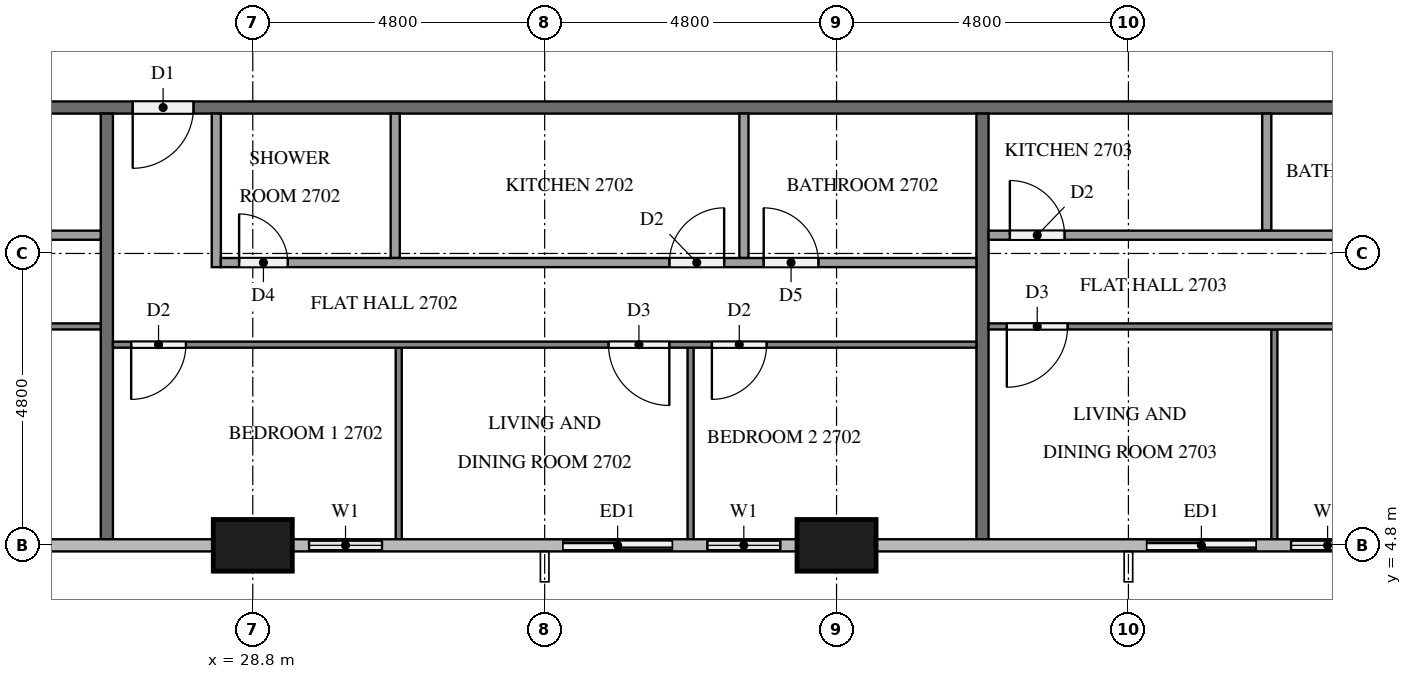
"""IFC4 building model, lengths in metres.
Left out: names, types, materials, properties, quantities, classifications, styles, units other than length and angle.
Written with IfcOpenShell. Run it as: python <this file> out.ifc"""

import sys

from ifc_helpers import new_model, si_unit, direction, frame, frame_2d, origin, origin_2d, place, context, subcontext, project, spatial, rectangle, extrude, element, fill, save


model = new_model("IFC4")
c1 = context("Model", 3, precision=1e-05, world=origin(), true_north=direction((0.0, 1.0)))
c2 = subcontext(c1, "Body", "Model", "MODEL_VIEW")
j1 = project(units=[si_unit("LENGTHUNIT", "METRE"), si_unit("PLANEANGLEUNIT", "RADIAN")], contexts=[c1])
p1 = place(None, origin())
s1 = spatial("IfcSite", under=j1, at=p1, CompositionType="ELEMENT")
p2 = place(p1, origin())
s2 = spatial("IfcBuilding", under=s1, at=p2, CompositionType="ELEMENT")
p3 = place(p2, frame((0.0, 0.0, 106.7)))
s3 = spatial("IfcBuildingStorey", under=s2, at=p3, CompositionType="ELEMENT", Elevation=106.7)
for number, where, z_axis, x_axis in (
    (1, (28.8, 4.8, 0.0), (0.0, 0.0, 1.0), (1.0, 0.0, 0.0)),
    (2, (38.4, 4.8, 0.0), (0.0, 0.0, 1.0), (1.0, 0.0, 0.0)),
):
    element("IfcColumn", number, at=place(p3, frame(where, z_axis=z_axis, x_axis=x_axis)), inside=s3, PredefinedType="COLUMN", context=c2, shape_type="SweptSolid", body=[
        extrude(rectangle(XDim=1.3, YDim=0.85, at=origin_2d()), origin(), (0.0, 0.0, 1.0), 3.2),
    ])
p4 = place(p3, frame((29.45, 4.8, 0.0), z_axis=(0.0, 0.0, 1.0), x_axis=(1.0, 0.0, 0.0)))
e3 = element("IfcWall", 3, at=p4, inside=s3, PredefinedType="SOLIDWALL", context=c2, shape_type="SweptSolid", body=[
    extrude(rectangle(XDim=1.75, YDim=0.15, at=frame_2d((0.875, 0.0))), origin(), (0.0, 0.0, 1.0), 3.2),
])
p5 = place(p4, frame((0.275, 0.0, 0.9)))
e4 = element("IfcOpeningElement", 4, at=p5, cuts=e3, PredefinedType="OPENING", context=c2, shape_type="SweptSolid", body=[
    extrude(rectangle(XDim=1.2, YDim=1.4, at=frame_2d((0.6, 0.7))), frame((0.0, 0.085, 0.0), z_axis=(0.0, -1.0, 0.0), x_axis=(1.0, 0.0, 0.0)), (0.0, 0.0, 1.0), 0.17),
])
p6 = place(p3, frame((33.6, 4.8, 0.0), z_axis=(0.0, 0.0, 1.0), x_axis=(1.0, 0.0, 0.0)))
e5 = element("IfcWall", 5, at=p6, inside=s3, PredefinedType="SOLIDWALL", context=c2, shape_type="SweptSolid", body=[
    extrude(rectangle(XDim=4.15, YDim=0.15, at=frame_2d((2.075, 0.0))), origin(), (0.0, 0.0, 1.0), 3.2),
])
p7 = place(p6, frame((0.3, 0.0, 0.0)))
e6 = element("IfcOpeningElement", 6, at=p7, cuts=e5, PredefinedType="OPENING", context=c2, shape_type="SweptSolid", body=[
    extrude(rectangle(XDim=1.8, YDim=2.4, at=frame_2d((0.9, 1.2))), frame((0.0, 0.085, 0.0), z_axis=(0.0, -1.0, 0.0), x_axis=(1.0, 0.0, 0.0)), (0.0, 0.0, 1.0), 0.17),
])
p8 = place(p6, frame((2.675, 0.0, 0.9)))
e7 = element("IfcOpeningElement", 7, at=p8, cuts=e5, PredefinedType="OPENING", context=c2, shape_type="SweptSolid", body=[
    extrude(rectangle(XDim=1.2, YDim=1.4, at=frame_2d((0.6, 0.7))), frame((0.0, 0.085, 0.0), z_axis=(0.0, -1.0, 0.0), x_axis=(1.0, 0.0, 0.0)), (0.0, 0.0, 1.0), 0.17),
])
p9 = place(p3, frame((43.2, 4.8, 0.0), z_axis=(0.0, 0.0, 1.0), x_axis=(1.0, 0.0, 0.0)))
e8 = element("IfcWall", 8, at=p9, inside=s3, PredefinedType="SOLIDWALL", context=c2, shape_type="SweptSolid", body=[
    extrude(rectangle(XDim=4.15, YDim=0.15, at=frame_2d((2.075, 0.0))), origin(), (0.0, 0.0, 1.0), 3.2),
])
p10 = place(p9, frame((0.3, 0.0, 0.0)))
e9 = element("IfcOpeningElement", 9, at=p10, cuts=e8, PredefinedType="OPENING", context=c2, shape_type="SweptSolid", body=[
    extrude(rectangle(XDim=1.8, YDim=2.4, at=frame_2d((0.9, 1.2))), frame((0.0, 0.085, 0.0), z_axis=(0.0, -1.0, 0.0), x_axis=(1.0, 0.0, 0.0)), (0.0, 0.0, 1.0), 0.17),
])
p11 = place(p9, frame((2.675, 0.0, 0.9)))
e10 = element("IfcOpeningElement", 10, at=p11, cuts=e8, PredefinedType="OPENING", context=c2, shape_type="SweptSolid", body=[
    extrude(rectangle(XDim=1.2, YDim=1.4, at=frame_2d((0.6, 0.7))), frame((0.0, 0.085, 0.0), z_axis=(0.0, -1.0, 0.0), x_axis=(1.0, 0.0, 0.0)), (0.0, 0.0, 1.0), 0.17),
])
p12 = place(p3, frame((50.5, 12.0, 0.0), z_axis=(0.0, 0.0, 1.0), x_axis=(-1.0, 0.0, 0.0)))
e11 = element("IfcWall", 11, at=p12, inside=s3, PredefinedType="PARTITIONING", context=c2, shape_type="SweptSolid", body=[
    extrude(rectangle(XDim=38.6, YDim=0.2, at=frame_2d((19.3, 0.0))), origin(), (0.0, 0.0, 1.0), 3.2),
])
p13 = place(p12, frame((37.075, 0.0, 0.0)))
e12 = element("IfcOpeningElement", 12, at=p13, cuts=e11, PredefinedType="OPENING", context=c2, shape_type="SweptSolid", body=[
    extrude(rectangle(XDim=1.0, YDim=2.1, at=frame_2d((0.5, 1.05))), frame((0.0, 0.11, 0.0), z_axis=(0.0, -1.0, 0.0), x_axis=(1.0, 0.0, 0.0)), (0.0, 0.0, 1.0), 0.22),
])
p14 = place(p12, frame((22.675, 0.0, 0.0)))
e13 = element("IfcOpeningElement", 13, at=p14, cuts=e11, PredefinedType="OPENING", context=c2, shape_type="SweptSolid", body=[
    extrude(rectangle(XDim=1.0, YDim=2.1, at=frame_2d((0.5, 1.05))), frame((0.0, 0.11, 0.0), z_axis=(0.0, -1.0, 0.0), x_axis=(1.0, 0.0, 0.0)), (0.0, 0.0, 1.0), 0.22),
])
p15 = place(p12, frame((0.525, 0.0, 0.0)))
e14 = element("IfcOpeningElement", 14, at=p15, cuts=e11, PredefinedType="OPENING", context=c2, shape_type="SweptSolid", body=[
    extrude(rectangle(XDim=1.0, YDim=2.1, at=frame_2d((0.5, 1.05))), frame((0.0, 0.11, 0.0), z_axis=(0.0, -1.0, 0.0), x_axis=(1.0, 0.0, 0.0)), (0.0, 0.0, 1.0), 0.22),
])
for number, where, z_axis, x_axis in (
    (15, (26.4, 11.9, 0.0), (0.0, 0.0, 1.0), (0.0, -1.0, 0.0)),
    (16, (40.8, 11.9, 0.0), (0.0, 0.0, 1.0), (0.0, -1.0, 0.0)),
):
    element("IfcWall", number, at=place(p3, frame(where, z_axis=z_axis, x_axis=x_axis)), inside=s3, PredefinedType="PARTITIONING", context=c2, shape_type="SweptSolid", body=[
        extrude(rectangle(XDim=7.0, YDim=0.2, at=frame_2d((3.5, 0.0))), origin(), (0.0, 0.0, 1.0), 3.2),
    ])
p16 = place(p3, frame((26.3, 8.4, 0.0), z_axis=(0.0, 0.0, 1.0), x_axis=(-1.0, 0.0, 0.0)))
e17 = element("IfcWall", 17, at=p16, inside=s3, PredefinedType="PARTITIONING", context=c2, shape_type="SweptSolid", body=[
    extrude(rectangle(XDim=14.2, YDim=0.1, at=frame_2d((7.1, 0.0))), origin(), (0.0, 0.0, 1.0), 3.2),
])
p17 = place(p16, frame((12.9, 0.0, 0.0)))
e18 = element("IfcOpeningElement", 18, at=p17, cuts=e17, PredefinedType="OPENING", context=c2, shape_type="SweptSolid", body=[
    extrude(rectangle(XDim=1.0, YDim=2.1, at=frame_2d((0.5, 1.05))), frame((0.0, 0.06, 0.0), z_axis=(0.0, -1.0, 0.0), x_axis=(1.0, 0.0, 0.0)), (0.0, 0.0, 1.0), 0.12),
])
p18 = place(p16, frame((5.05, 0.0, 0.0)))
e19 = element("IfcOpeningElement", 19, at=p18, cuts=e17, PredefinedType="OPENING", context=c2, shape_type="SweptSolid", body=[
    extrude(rectangle(XDim=0.9, YDim=2.1, at=frame_2d((0.45, 1.05))), frame((0.0, 0.06, 0.0), z_axis=(0.0, -1.0, 0.0), x_axis=(1.0, 0.0, 0.0)), (0.0, 0.0, 1.0), 0.12),
])
p19 = place(p16, frame((3.45, 0.0, 0.0)))
e20 = element("IfcOpeningElement", 20, at=p19, cuts=e17, PredefinedType="OPENING", context=c2, shape_type="SweptSolid", body=[
    extrude(rectangle(XDim=0.9, YDim=2.1, at=frame_2d((0.45, 1.05))), frame((0.0, 0.06, 0.0), z_axis=(0.0, -1.0, 0.0), x_axis=(1.0, 0.0, 0.0)), (0.0, 0.0, 1.0), 0.12),
])
p20 = place(p3, frame((13.875, 9.9, 0.0), z_axis=(0.0, 0.0, 1.0), x_axis=(1.0, 0.0, 0.0)))
e21 = element("IfcWall", 21, at=p20, inside=s3, PredefinedType="PARTITIONING", context=c2, shape_type="SweptSolid", body=[
    extrude(rectangle(XDim=12.425, YDim=0.15, at=frame_2d((6.212, 0.0))), origin(), (0.0, 0.0, 1.0), 3.2),
])
p21 = place(p20, frame((0.3, 0.0, 0.0)))
e22 = element("IfcOpeningElement", 22, at=p21, cuts=e21, PredefinedType="OPENING", context=c2, shape_type="SweptSolid", body=[
    extrude(rectangle(XDim=0.8, YDim=2.1, at=frame_2d((0.4, 1.05))), frame((0.0, 0.085, 0.0), z_axis=(0.0, -1.0, 0.0), x_axis=(1.0, 0.0, 0.0)), (0.0, 0.0, 1.0), 0.17),
])
p22 = place(p20, frame((5.465, 0.0, 0.0)))
e23 = element("IfcOpeningElement", 23, at=p22, cuts=e21, PredefinedType="OPENING", context=c2, shape_type="SweptSolid", body=[
    extrude(rectangle(XDim=0.9, YDim=2.1, at=frame_2d((0.45, 1.05))), frame((0.0, 0.085, 0.0), z_axis=(0.0, -1.0, 0.0), x_axis=(1.0, 0.0, 0.0)), (0.0, 0.0, 1.0), 0.17),
])
p23 = place(p20, frame((7.015, 0.0, 0.0)))
e24 = element("IfcOpeningElement", 24, at=p23, cuts=e21, PredefinedType="OPENING", context=c2, shape_type="SweptSolid", body=[
    extrude(rectangle(XDim=0.9, YDim=2.1, at=frame_2d((0.45, 1.05))), frame((0.0, 0.085, 0.0), z_axis=(0.0, -1.0, 0.0), x_axis=(1.0, 0.0, 0.0)), (0.0, 0.0, 1.0), 0.17),
])
for number, where, z_axis, x_axis in (
    (25, (31.2, 8.05, 0.0), (0.0, 0.0, 1.0), (0.0, -1.0, 0.0)),
    (26, (36.0, 8.05, 0.0), (0.0, 0.0, 1.0), (0.0, -1.0, 0.0)),
):
    element("IfcWall", number, at=place(p3, frame(where, z_axis=z_axis, x_axis=x_axis)), inside=s3, PredefinedType="PARTITIONING", context=c2, shape_type="SweptSolid", body=[
        extrude(rectangle(XDim=3.15, YDim=0.1, at=frame_2d((1.575, 0.0))), origin(), (0.0, 0.0, 1.0), 3.2),
    ])
p24 = place(p3, frame((40.7, 8.1, 0.0), z_axis=(0.0, 0.0, 1.0), x_axis=(-1.0, 0.0, 0.0)))
e27 = element("IfcWall", 27, at=p24, inside=s3, PredefinedType="PARTITIONING", context=c2, shape_type="SweptSolid", body=[
    extrude(rectangle(XDim=14.2, YDim=0.1, at=frame_2d((7.1, 0.0))), origin(), (0.0, 0.0, 1.0), 3.2),
])
p25 = place(p24, frame((13.0, 0.0, 0.0)))
e28 = element("IfcOpeningElement", 28, at=p25, cuts=e27, PredefinedType="OPENING", context=c2, shape_type="SweptSolid", body=[
    extrude(rectangle(XDim=0.9, YDim=2.1, at=frame_2d((0.45, 1.05))), frame((0.0, 0.06, 0.0), z_axis=(0.0, -1.0, 0.0), x_axis=(1.0, 0.0, 0.0)), (0.0, 0.0, 1.0), 0.12),
])
p26 = place(p24, frame((5.05, 0.0, 0.0)))
e29 = element("IfcOpeningElement", 29, at=p26, cuts=e27, PredefinedType="OPENING", context=c2, shape_type="SweptSolid", body=[
    extrude(rectangle(XDim=1.0, YDim=2.1, at=frame_2d((0.5, 1.05))), frame((0.0, 0.06, 0.0), z_axis=(0.0, -1.0, 0.0), x_axis=(1.0, 0.0, 0.0)), (0.0, 0.0, 1.0), 0.12),
])
p27 = place(p24, frame((3.45, 0.0, 0.0)))
e30 = element("IfcOpeningElement", 30, at=p27, cuts=e27, PredefinedType="OPENING", context=c2, shape_type="SweptSolid", body=[
    extrude(rectangle(XDim=0.9, YDim=2.1, at=frame_2d((0.45, 1.05))), frame((0.0, 0.06, 0.0), z_axis=(0.0, -1.0, 0.0), x_axis=(1.0, 0.0, 0.0)), (0.0, 0.0, 1.0), 0.12),
])
for number, where, z_axis, x_axis in (
    (31, (31.142, 11.9, 0.0), (0.0, 0.0, 1.0), (0.0, -1.0, 0.0)),
    (32, (36.877, 11.9, 0.0), (0.0, 0.0, 1.0), (0.0, -1.0, 0.0)),
):
    element("IfcWall", number, at=place(p3, frame(where, z_axis=z_axis, x_axis=x_axis)), inside=s3, PredefinedType="PARTITIONING", context=c2, shape_type="SweptSolid", body=[
        extrude(rectangle(XDim=2.375, YDim=0.15, at=frame_2d((1.188, 0.0))), origin(), (0.0, 0.0, 1.0), 3.2),
    ])
p28 = place(p3, frame((28.2, 11.9, 0.0), z_axis=(0.0, 0.0, 1.0), x_axis=(0.0, -1.0, 0.0)))
e33 = element("IfcWall", 33, at=p28, inside=s3, PredefinedType="PARTITIONING", context=c2, shape_type="SweptSolid", body=[
    extrude(rectangle(XDim=2.525, YDim=0.15, at=frame_2d((1.262, 0.0))), origin(), (0.0, 0.0, 1.0), 3.2),
])
p29 = place(p3, frame((28.275, 9.45, 0.0), z_axis=(0.0, 0.0, 1.0), x_axis=(1.0, 0.0, 0.0)))
e34 = element("IfcWall", 34, at=p29, inside=s3, PredefinedType="PARTITIONING", context=c2, shape_type="SweptSolid", body=[
    extrude(rectangle(XDim=12.425, YDim=0.15, at=frame_2d((6.212, 0.0))), origin(), (0.0, 0.0, 1.0), 3.2),
])
p30 = place(p29, frame((0.3, 0.0, 0.0)))
e35 = element("IfcOpeningElement", 35, at=p30, cuts=e34, PredefinedType="OPENING", context=c2, shape_type="SweptSolid", body=[
    extrude(rectangle(XDim=0.8, YDim=2.1, at=frame_2d((0.4, 1.05))), frame((0.0, 0.085, 0.0), z_axis=(0.0, -1.0, 0.0), x_axis=(1.0, 0.0, 0.0)), (0.0, 0.0, 1.0), 0.17),
])
p31 = place(p29, frame((7.377, 0.0, 0.0)))
e36 = element("IfcOpeningElement", 36, at=p31, cuts=e34, PredefinedType="OPENING", context=c2, shape_type="SweptSolid", body=[
    extrude(rectangle(XDim=0.9, YDim=2.1, at=frame_2d((0.45, 1.05))), frame((0.0, 0.085, 0.0), z_axis=(0.0, -1.0, 0.0), x_axis=(1.0, 0.0, 0.0)), (0.0, 0.0, 1.0), 0.17),
])
p32 = place(p29, frame((8.927, 0.0, 0.0)))
e37 = element("IfcOpeningElement", 37, at=p32, cuts=e34, PredefinedType="OPENING", context=c2, shape_type="SweptSolid", body=[
    extrude(rectangle(XDim=0.9, YDim=2.1, at=frame_2d((0.45, 1.05))), frame((0.0, 0.085, 0.0), z_axis=(0.0, -1.0, 0.0), x_axis=(1.0, 0.0, 0.0)), (0.0, 0.0, 1.0), 0.17),
])
p33 = place(p3, frame((45.6, 8.35, 0.0), z_axis=(0.0, 0.0, 1.0), x_axis=(0.0, -1.0, 0.0)))
e38 = element("IfcWall", 38, at=p33, inside=s3, PredefinedType="PARTITIONING", context=c2, shape_type="SweptSolid", body=[
    extrude(rectangle(XDim=3.45, YDim=0.1, at=frame_2d((1.725, 0.0))), origin(), (0.0, 0.0, 1.0), 3.2),
])
p34 = place(p3, frame((50.3, 8.4, 0.0), z_axis=(0.0, 0.0, 1.0), x_axis=(-1.0, 0.0, 0.0)))
e39 = element("IfcWall", 39, at=p34, inside=s3, PredefinedType="PARTITIONING", context=c2, shape_type="SweptSolid", body=[
    extrude(rectangle(XDim=9.4, YDim=0.1, at=frame_2d((4.7, 0.0))), origin(), (0.0, 0.0, 1.0), 3.2),
])
p35 = place(p34, frame((0.3, 0.0, 0.0)))
e40 = element("IfcOpeningElement", 40, at=p35, cuts=e39, PredefinedType="OPENING", context=c2, shape_type="SweptSolid", body=[
    extrude(rectangle(XDim=0.9, YDim=2.1, at=frame_2d((0.45, 1.05))), frame((0.0, 0.06, 0.0), z_axis=(0.0, -1.0, 0.0), x_axis=(1.0, 0.0, 0.0)), (0.0, 0.0, 1.0), 0.12),
])
p36 = place(p34, frame((8.1, 0.0, 0.0)))
e41 = element("IfcOpeningElement", 41, at=p36, cuts=e39, PredefinedType="OPENING", context=c2, shape_type="SweptSolid", body=[
    extrude(rectangle(XDim=1.0, YDim=2.1, at=frame_2d((0.5, 1.05))), frame((0.0, 0.06, 0.0), z_axis=(0.0, -1.0, 0.0), x_axis=(1.0, 0.0, 0.0)), (0.0, 0.0, 1.0), 0.12),
])
p37 = place(p3, frame((45.475, 11.9, 0.0), z_axis=(0.0, 0.0, 1.0), x_axis=(0.0, -1.0, 0.0)))
e42 = element("IfcWall", 42, at=p37, inside=s3, PredefinedType="PARTITIONING", context=c2, shape_type="SweptSolid", body=[
    extrude(rectangle(XDim=1.925, YDim=0.15, at=frame_2d((0.962, 0.0))), origin(), (0.0, 0.0, 1.0), 3.2),
])
p38 = place(p3, frame((40.9, 9.9, 0.0), z_axis=(0.0, 0.0, 1.0), x_axis=(1.0, 0.0, 0.0)))
e43 = element("IfcWall", 43, at=p38, inside=s3, PredefinedType="PARTITIONING", context=c2, shape_type="SweptSolid", body=[
    extrude(rectangle(XDim=7.625, YDim=0.15, at=frame_2d((3.812, 0.0))), origin(), (0.0, 0.0, 1.0), 3.2),
])
p39 = place(p38, frame((6.525, 0.0, 0.0)))
e44 = element("IfcOpeningElement", 44, at=p39, cuts=e43, PredefinedType="OPENING", context=c2, shape_type="SweptSolid", body=[
    extrude(rectangle(XDim=0.8, YDim=2.1, at=frame_2d((0.4, 1.05))), frame((0.0, 0.085, 0.0), z_axis=(0.0, -1.0, 0.0), x_axis=(1.0, 0.0, 0.0)), (0.0, 0.0, 1.0), 0.17),
])
p40 = place(p38, frame((0.35, 0.0, 0.0)))
e45 = element("IfcOpeningElement", 45, at=p40, cuts=e43, PredefinedType="OPENING", context=c2, shape_type="SweptSolid", body=[
    extrude(rectangle(XDim=0.9, YDim=2.1, at=frame_2d((0.45, 1.05))), frame((0.0, 0.085, 0.0), z_axis=(0.0, -1.0, 0.0), x_axis=(1.0, 0.0, 0.0)), (0.0, 0.0, 1.0), 0.17),
])
p41 = place(p5, origin())
e46 = element("IfcWindow", 46, at=p41, inside=s3, PartitioningType="SINGLE_PANEL", PredefinedType="WINDOW", context=c2, shape_type="SweptSolid", body=[
    extrude(rectangle(XDim=1.2, YDim=1.4, at=frame_2d((0.6, 0.7))), frame((0.0, 0.03, 0.0), z_axis=(0.0, -1.0, 0.0), x_axis=(1.0, 0.0, 0.0)), (0.0, 0.0, 1.0), 0.06),
])
fill(e4, e46)
p42 = place(p7, origin())
e47 = element("IfcDoor", 47, at=p42, inside=s3, OperationType="SLIDING_TO_RIGHT", PredefinedType="DOOR", context=c2, shape_type="SweptSolid", body=[
    extrude(rectangle(XDim=1.8, YDim=2.4, at=frame_2d((0.9, 1.2))), frame((0.0, 0.025, 0.0), z_axis=(0.0, -1.0, 0.0), x_axis=(1.0, 0.0, 0.0)), (0.0, 0.0, 1.0), 0.05),
])
fill(e6, e47)
p43 = place(p8, origin())
e48 = element("IfcWindow", 48, at=p43, inside=s3, PartitioningType="SINGLE_PANEL", PredefinedType="WINDOW", context=c2, shape_type="SweptSolid", body=[
    extrude(rectangle(XDim=1.2, YDim=1.4, at=frame_2d((0.6, 0.7))), frame((0.0, 0.03, 0.0), z_axis=(0.0, -1.0, 0.0), x_axis=(1.0, 0.0, 0.0)), (0.0, 0.0, 1.0), 0.06),
])
fill(e7, e48)
p44 = place(p10, origin())
e49 = element("IfcDoor", 49, at=p44, inside=s3, OperationType="SLIDING_TO_LEFT", PredefinedType="DOOR", context=c2, shape_type="SweptSolid", body=[
    extrude(rectangle(XDim=1.8, YDim=2.4, at=frame_2d((0.9, 1.2))), frame((0.0, 0.025, 0.0), z_axis=(0.0, -1.0, 0.0), x_axis=(1.0, 0.0, 0.0)), (0.0, 0.0, 1.0), 0.05),
])
fill(e9, e49)
p45 = place(p11, origin())
e50 = element("IfcWindow", 50, at=p45, inside=s3, PartitioningType="SINGLE_PANEL", PredefinedType="WINDOW", context=c2, shape_type="SweptSolid", body=[
    extrude(rectangle(XDim=1.2, YDim=1.4, at=frame_2d((0.6, 0.7))), frame((0.0, 0.03, 0.0), z_axis=(0.0, -1.0, 0.0), x_axis=(1.0, 0.0, 0.0)), (0.0, 0.0, 1.0), 0.06),
])
fill(e10, e50)
p46 = place(p14, origin())
e51 = element("IfcDoor", 51, at=p46, inside=s3, OperationType="SINGLE_SWING_RIGHT", PredefinedType="DOOR", context=c2, shape_type="SweptSolid", body=[
    extrude(rectangle(XDim=1.0, YDim=2.1, at=frame_2d((0.5, 1.05))), frame((0.0, 0.025, 0.0), z_axis=(0.0, -1.0, 0.0), x_axis=(1.0, 0.0, 0.0)), (0.0, 0.0, 1.0), 0.05),
])
fill(e13, e51)
p47 = place(p25, origin())
e52 = element("IfcDoor", 52, at=p47, inside=s3, OperationType="SINGLE_SWING_RIGHT", PredefinedType="DOOR", context=c2, shape_type="SweptSolid", body=[
    extrude(rectangle(XDim=0.9, YDim=2.1, at=frame_2d((0.45, 1.05))), frame((0.0, 0.025, 0.0), z_axis=(0.0, -1.0, 0.0), x_axis=(1.0, 0.0, 0.0)), (0.0, 0.0, 1.0), 0.05),
])
fill(e28, e52)
p48 = place(p26, origin())
e53 = element("IfcDoor", 53, at=p48, inside=s3, OperationType="SINGLE_SWING_LEFT", PredefinedType="DOOR", context=c2, shape_type="SweptSolid", body=[
    extrude(rectangle(XDim=1.0, YDim=2.1, at=frame_2d((0.5, 1.05))), frame((0.0, 0.025, 0.0), z_axis=(0.0, -1.0, 0.0), x_axis=(1.0, 0.0, 0.0)), (0.0, 0.0, 1.0), 0.05),
])
fill(e29, e53)
p49 = place(p27, origin())
e54 = element("IfcDoor", 54, at=p49, inside=s3, OperationType="SINGLE_SWING_RIGHT", PredefinedType="DOOR", context=c2, shape_type="SweptSolid", body=[
    extrude(rectangle(XDim=0.9, YDim=2.1, at=frame_2d((0.45, 1.05))), frame((0.0, 0.025, 0.0), z_axis=(0.0, -1.0, 0.0), x_axis=(1.0, 0.0, 0.0)), (0.0, 0.0, 1.0), 0.05),
])
fill(e30, e54)
p50 = place(p30, origin())
e55 = element("IfcDoor", 55, at=p50, inside=s3, OperationType="SINGLE_SWING_LEFT", PredefinedType="DOOR", context=c2, shape_type="SweptSolid", body=[
    extrude(rectangle(XDim=0.8, YDim=2.1, at=frame_2d((0.4, 1.05))), frame((0.0, 0.025, 0.0), z_axis=(0.0, -1.0, 0.0), x_axis=(1.0, 0.0, 0.0)), (0.0, 0.0, 1.0), 0.05),
])
fill(e35, e55)
p51 = place(p31, origin())
e56 = element("IfcDoor", 56, at=p51, inside=s3, OperationType="SINGLE_SWING_RIGHT", PredefinedType="DOOR", context=c2, shape_type="SweptSolid", body=[
    extrude(rectangle(XDim=0.9, YDim=2.1, at=frame_2d((0.45, 1.05))), frame((0.0, 0.025, 0.0), z_axis=(0.0, -1.0, 0.0), x_axis=(1.0, 0.0, 0.0)), (0.0, 0.0, 1.0), 0.05),
])
fill(e36, e56)
p52 = place(p32, origin())
e57 = element("IfcDoor", 57, at=p52, inside=s3, OperationType="SINGLE_SWING_LEFT", PredefinedType="DOOR", context=c2, shape_type="SweptSolid", body=[
    extrude(rectangle(XDim=0.9, YDim=2.1, at=frame_2d((0.45, 1.05))), frame((0.0, 0.025, 0.0), z_axis=(0.0, -1.0, 0.0), x_axis=(1.0, 0.0, 0.0)), (0.0, 0.0, 1.0), 0.05),
])
fill(e37, e57)
p53 = place(p36, origin())
e58 = element("IfcDoor", 58, at=p53, inside=s3, OperationType="SINGLE_SWING_RIGHT", PredefinedType="DOOR", context=c2, shape_type="SweptSolid", body=[
    extrude(rectangle(XDim=1.0, YDim=2.1, at=frame_2d((0.5, 1.05))), frame((0.0, 0.025, 0.0), z_axis=(0.0, -1.0, 0.0), x_axis=(1.0, 0.0, 0.0)), (0.0, 0.0, 1.0), 0.05),
])
fill(e41, e58)
p54 = place(p40, origin())
e59 = element("IfcDoor", 59, at=p54, inside=s3, OperationType="SINGLE_SWING_LEFT", PredefinedType="DOOR", context=c2, shape_type="SweptSolid", body=[
    extrude(rectangle(XDim=0.9, YDim=2.1, at=frame_2d((0.45, 1.05))), frame((0.0, 0.025, 0.0), z_axis=(0.0, -1.0, 0.0), x_axis=(1.0, 0.0, 0.0)), (0.0, 0.0, 1.0), 0.05),
])
fill(e45, e59)
save(model, sys.argv[1])
